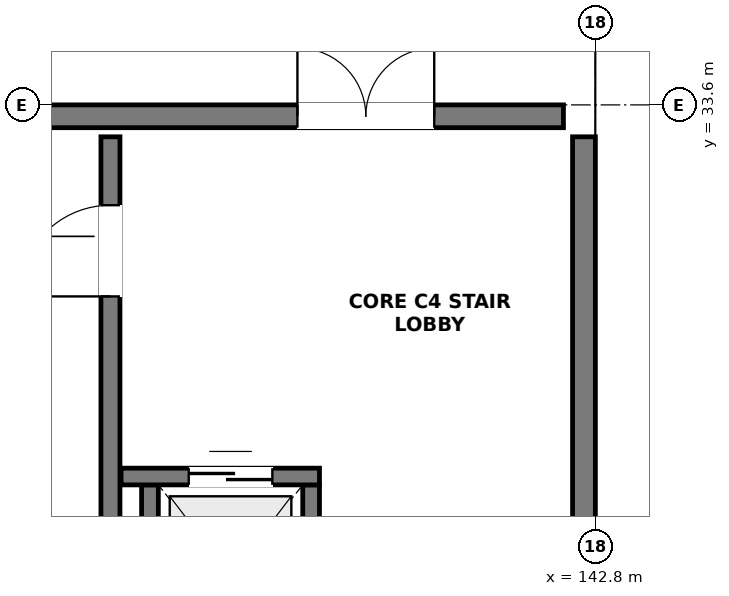
"""IFC4 building model, lengths in metres.
Left out: names, types, materials, properties, quantities, classifications, styles, units other than length and angle.
Written with IfcOpenShell. Run it as: python <this file> out.ifc"""

import sys

from ifc_helpers import new_model, si_unit, direction, frame, frame_2d, origin, place, context, subcontext, project, spatial, rectangle, extrude, element, fill, save


model = new_model("IFC4")
c1 = context("Model", 3, precision=1e-05, world=origin(), true_north=direction((0.0, 1.0)))
c2 = subcontext(c1, "Body", "Model", "MODEL_VIEW")
j1 = project(units=[si_unit("LENGTHUNIT", "METRE"), si_unit("PLANEANGLEUNIT", "RADIAN")], contexts=[c1])
p1 = place(None, origin())
s1 = spatial("IfcSite", under=j1, at=p1, CompositionType="ELEMENT")
p2 = place(p1, origin())
s2 = spatial("IfcBuilding", under=s1, at=p2, CompositionType="ELEMENT")
p3 = place(p2, frame((0.0, 0.0, 9.9)))
s3 = spatial("IfcBuildingStorey", under=s2, at=p3, CompositionType="ELEMENT", Elevation=9.9)
p4 = place(p3, frame((126.45, 33.45, 0.0), z_axis=(0.0, 0.0, 1.0), x_axis=(1.0, 0.0, 0.0)))
e1 = element("IfcWall", 1, at=p4, inside=s3, PredefinedType="SHEAR", context=c2, shape_type="SweptSolid", body=[
    extrude(rectangle(XDim=15.93, YDim=0.3, at=frame_2d((7.965, 0.0))), origin(), (0.0, 0.0, 1.0), 4.22),
])
p5 = place(p4, frame((12.43, 0.0, 0.0)))
e2 = element("IfcOpeningElement", 2, at=p5, cuts=e1, PredefinedType="OPENING", context=c2, shape_type="SweptSolid", body=[
    extrude(rectangle(XDim=1.8, YDim=2.2, at=frame_2d((0.9, 1.1))), frame((0.0, 0.162, 0.0), z_axis=(0.0, -1.0, 0.0), x_axis=(1.0, 0.0, 0.0)), (0.0, 0.0, 1.0), 0.324),
])
p6 = place(p3, frame((142.65, 25.62, 0.0), z_axis=(0.0, 0.0, 1.0), x_axis=(0.0, 1.0, 0.0)))
e3 = element("IfcWall", 3, at=p6, inside=s3, PredefinedType="SHEAR", context=c2, shape_type="SweptSolid", body=[
    extrude(rectangle(XDim=7.56, YDim=0.3, at=frame_2d((3.78, 0.0))), origin(), (0.0, 0.0, 1.0), 4.22),
])
p7 = place(p3, frame((136.42, 25.62, 0.0), z_axis=(0.0, 0.0, 1.0), x_axis=(0.0, 1.0, 0.0)))
e4 = element("IfcWall", 4, at=p7, inside=s3, PredefinedType="SHEAR", context=c2, shape_type="SweptSolid", body=[
    extrude(rectangle(XDim=7.56, YDim=0.25, at=frame_2d((3.78, 0.0))), origin(), (0.0, 0.0, 1.0), 4.22),
])
p8 = place(p7, frame((5.46, 0.0, 0.0)))
e5 = element("IfcOpeningElement", 5, at=p8, cuts=e4, PredefinedType="OPENING", context=c2, shape_type="SweptSolid", body=[
    extrude(rectangle(XDim=1.2, YDim=2.2, at=frame_2d((0.6, 1.1))), frame((0.0, 0.137, 0.0), z_axis=(0.0, -1.0, 0.0), x_axis=(1.0, 0.0, 0.0)), (0.0, 0.0, 1.0), 0.274),
])
for number, where, z_axis, x_axis in (
    (6, (136.94, 26.2, 0.0), (0.0, 0.0, 1.0), (0.0, 1.0, 0.0)),
    (7, (139.06, 26.2, 0.0), (0.0, 0.0, 1.0), (0.0, 1.0, 0.0)),
):
    element("IfcWall", number, at=place(p3, frame(where, z_axis=z_axis, x_axis=x_axis)), inside=s3, PredefinedType="SOLIDWALL", context=c2, shape_type="SweptSolid", body=[
        extrude(rectangle(XDim=2.4, YDim=0.22, at=frame_2d((1.2, 0.0))), origin(), (0.0, 0.0, 1.0), 4.22),
    ])
p9 = place(p3, frame((136.56, 28.71, 0.0), z_axis=(0.0, 0.0, 1.0), x_axis=(1.0, 0.0, 0.0)))
e8 = element("IfcWall", 8, at=p9, inside=s3, PredefinedType="SOLIDWALL", context=c2, shape_type="SweptSolid", body=[
    extrude(rectangle(XDim=2.61, YDim=0.22, at=frame_2d((1.305, 0.0))), origin(), (0.0, 0.0, 1.0), 4.22),
])
p10 = place(p9, frame((0.89, 0.0, 0.0)))
e9 = element("IfcOpeningElement", 9, at=p10, cuts=e8, PredefinedType="OPENING", context=c2, shape_type="SweptSolid", body=[
    extrude(rectangle(XDim=1.1, YDim=2.15, at=frame_2d((0.55, 1.075))), frame((0.0, 0.122, 0.0), z_axis=(0.0, -1.0, 0.0), x_axis=(1.0, 0.0, 0.0)), (0.0, 0.0, 1.0), 0.244),
])
p11 = place(p5, origin())
e10 = element("IfcDoor", 10, at=p11, inside=s3, OperationType="DOUBLE_DOOR_SINGLE_SWING", PredefinedType="DOOR", context=c2, shape_type="SweptSolid", body=[
    extrude(rectangle(XDim=1.8, YDim=2.2, at=frame_2d((0.9, 1.1))), frame((0.0, 0.025, 0.0), z_axis=(0.0, -1.0, 0.0), x_axis=(1.0, 0.0, 0.0)), (0.0, 0.0, 1.0), 0.05),
])
fill(e2, e10)
p12 = place(p8, origin())
e11 = element("IfcDoor", 11, at=p12, inside=s3, OperationType="SINGLE_SWING_LEFT", PredefinedType="DOOR", context=c2, shape_type="SweptSolid", body=[
    extrude(rectangle(XDim=1.2, YDim=2.2, at=frame_2d((0.6, 1.1))), frame((0.0, 0.025, 0.0), z_axis=(0.0, -1.0, 0.0), x_axis=(1.0, 0.0, 0.0)), (0.0, 0.0, 1.0), 0.05),
])
fill(e5, e11)
p13 = place(p10, origin())
e12 = element("IfcDoor", 12, at=p13, inside=s3, OperationType="DOUBLE_DOOR_SLIDING", PredefinedType="DOOR", context=c2, shape_type="SweptSolid", body=[
    extrude(rectangle(XDim=1.1, YDim=2.15, at=frame_2d((0.55, 1.075))), frame((0.0, 0.025, 0.0), z_axis=(0.0, -1.0, 0.0), x_axis=(1.0, 0.0, 0.0)), (0.0, 0.0, 1.0), 0.05),
])
fill(e9, e12)
save(model, sys.argv[1])
